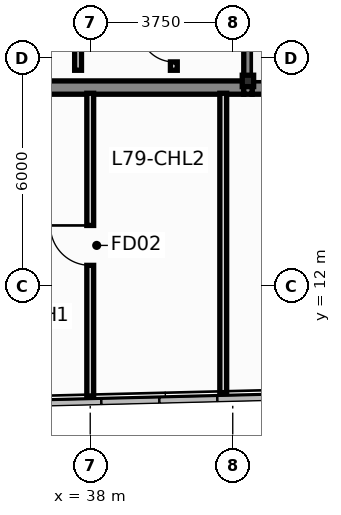
"""IFC4 building model, lengths in metres.
Left out: names, types, materials, properties, quantities, classifications, styles, units other than length and angle.
Written with IfcOpenShell. Run it as: python <this file> out.ifc"""

import sys

from ifc_helpers import new_model, si_unit, direction, frame, frame_2d, origin, origin_2d, place, context, subcontext, project, spatial, rectangle, hollow_rectangle, extrude, source, transform, mapped, element, fill, save


model = new_model("IFC4")
c1 = context("Model", 3, precision=1e-05, world=origin(), true_north=direction((0.0, 1.0)))
c2 = subcontext(c1, "Body", "Model", "MODEL_VIEW")
j1 = project(units=[si_unit("LENGTHUNIT", "METRE"), si_unit("PLANEANGLEUNIT", "RADIAN")], contexts=[c1])
p1 = place(None, origin())
s1 = spatial("IfcSite", under=j1, at=p1, CompositionType="ELEMENT")
p2 = place(p1, origin())
s2 = spatial("IfcBuilding", under=s1, at=p2, CompositionType="ELEMENT")
p3 = place(p2, frame((0.0, 0.0, 300.0)))
s3 = spatial("IfcBuildingStorey", under=s2, at=p3, CompositionType="ELEMENT", Elevation=300.0)
m1 = source(origin(), c2, "Body", "SweptSolid", [
    extrude(hollow_rectangle(XDim=0.3, YDim=0.3, WallThickness=0.012, at=origin_2d()), origin(), (0.0, 0.0, 1.0), 3.4),
])
p4 = place(p3, frame((42.15, 17.4, 0.0), z_axis=(0.0, 0.0, 1.0), x_axis=(1.0, 0.0, 0.0)))
e1 = element("IfcColumn", 1, at=p4, inside=s3, PredefinedType="COLUMN", context=c2, shape_type="MappedRepresentation", body=[
    mapped(m1, transform((0.0, 0.0, 0.0), scale=1.0)),
])
p5 = place(p3, frame((33.96, 17.225, 0.0), z_axis=(0.0, 0.0, 1.0), x_axis=(1.0, 0.0, 0.0)))
e2 = element("IfcWall", 2, at=p5, inside=s3, PredefinedType="SHEAR", context=c2, shape_type="SweptSolid", body=[
    extrude(rectangle(XDim=8.08, YDim=0.35, at=frame_2d((4.04, 0.0))), origin(), (0.0, 0.0, 1.0), 3.4),
])
p6 = place(p3, frame((42.26, 17.225, 0.0), z_axis=(0.0, 0.0, 1.0), x_axis=(1.0, 0.0, 0.0)))
e3 = element("IfcWall", 3, at=p6, inside=s3, PredefinedType="SHEAR", context=c2, shape_type="SweptSolid", body=[
    extrude(rectangle(XDim=2.9, YDim=0.35, at=frame_2d((1.45, 0.0))), origin(), (0.0, 0.0, 1.0), 3.4),
])
p7 = place(p3, frame((42.15, 17.05, 0.0), z_axis=(0.0, 0.0, 1.0), x_axis=(0.0, 1.0, 0.0)))
e4 = element("IfcWall", 4, at=p7, inside=s3, PredefinedType="SHEAR", context=c2, shape_type="SweptSolid", body=[
    extrude(rectangle(XDim=13.125, YDim=0.22, at=frame_2d((6.562, 0.0))), origin(), (0.0, 0.0, 1.0), 3.4),
])
p8 = place(p3, frame((37.68, 17.68, 0.0), z_axis=(0.0, 0.0, 1.0), x_axis=(0.0, 1.0, 0.0)))
e5 = element("IfcWall", 5, at=p8, inside=s3, PredefinedType="PARTITIONING", context=c2, shape_type="SweptSolid", body=[
    extrude(rectangle(XDim=2.7, YDim=0.18, at=frame_2d((1.35, 0.0))), origin(), (0.0, 0.0, 1.0), 3.15),
])
p9 = place(p8, frame((0.85, 0.0, 0.0)))
e6 = element("IfcOpeningElement", 6, at=p9, cuts=e5, PredefinedType="OPENING", context=c2, shape_type="SweptSolid", body=[
    extrude(rectangle(XDim=0.9, YDim=2.1, at=frame_2d((0.45, 1.05))), frame((0.0, 0.102, 0.0), z_axis=(0.0, -1.0, 0.0), x_axis=(1.0, 0.0, 0.0)), (0.0, 0.0, 1.0), 0.204),
])
p10 = place(p3, frame((40.2, 17.68, 0.0), z_axis=(0.0, 0.0, 1.0), x_axis=(0.0, 1.0, 0.0)))
e7 = element("IfcWall", 7, at=p10, inside=s3, PredefinedType="PARTITIONING", context=c2, shape_type="SweptSolid", body=[
    extrude(rectangle(XDim=2.7, YDim=0.18, at=frame_2d((1.35, 0.0))), origin(), (0.0, 0.0, 1.0), 3.15),
])
p11 = place(p10, frame((0.22, 0.0, 0.0)))
e8 = element("IfcOpeningElement", 8, at=p11, cuts=e7, PredefinedType="OPENING", context=c2, shape_type="SweptSolid", body=[
    extrude(rectangle(XDim=0.9, YDim=2.1, at=frame_2d((0.45, 1.05))), frame((0.0, 0.102, 0.0), z_axis=(0.0, -1.0, 0.0), x_axis=(1.0, 0.0, 0.0)), (0.0, 0.0, 1.0), 0.204),
])
p12 = place(p10, frame((1.54, 0.0, 0.0)))
e9 = element("IfcOpeningElement", 9, at=p12, cuts=e7, PredefinedType="OPENING", context=c2, shape_type="SweptSolid", body=[
    extrude(rectangle(XDim=0.9, YDim=2.1, at=frame_2d((0.45, 1.05))), frame((0.0, 0.102, 0.0), z_axis=(0.0, -1.0, 0.0), x_axis=(1.0, 0.0, 0.0)), (0.0, 0.0, 1.0), 0.204),
])
p13 = place(p3, frame((38.0, 9.07, 0.0), z_axis=(0.0, 0.0, 1.0), x_axis=(0.0, 1.0, 0.0)))
e10 = element("IfcWall", 10, at=p13, inside=s3, PredefinedType="PARTITIONING", context=c2, shape_type="SweptSolid", body=[
    extrude(rectangle(XDim=8.005, YDim=0.18, at=frame_2d((4.002, 0.0))), origin(), (0.0, 0.0, 1.0), 3.15),
])
p14 = place(p13, frame((3.477, 0.0, 0.0)))
e11 = element("IfcOpeningElement", 11, at=p14, cuts=e10, PredefinedType="OPENING", context=c2, shape_type="SweptSolid", body=[
    extrude(rectangle(XDim=1.05, YDim=2.15, at=frame_2d((0.525, 1.075))), frame((0.0, 0.102, 0.0), z_axis=(0.0, -1.0, 0.0), x_axis=(1.0, 0.0, 0.0)), (0.0, 0.0, 1.0), 0.204),
])
p15 = place(p3, frame((41.5, 9.15, 0.0), z_axis=(0.0, 0.0, 1.0), x_axis=(0.0, 1.0, 0.0)))
e12 = element("IfcWall", 12, at=p15, inside=s3, PredefinedType="PARTITIONING", context=c2, shape_type="SweptSolid", body=[
    extrude(rectangle(XDim=7.925, YDim=0.18, at=frame_2d((3.962, 0.0))), origin(), (0.0, 0.0, 1.0), 3.15),
])
p16 = place(p11, origin())
e13 = element("IfcDoor", 13, at=p16, inside=s3, OperationType="SINGLE_SWING_RIGHT", PredefinedType="DOOR", context=c2, shape_type="SweptSolid", body=[
    extrude(rectangle(XDim=0.9, YDim=2.1, at=frame_2d((0.45, 1.05))), frame((0.0, 0.025, 0.0), z_axis=(0.0, -1.0, 0.0), x_axis=(1.0, 0.0, 0.0)), (0.0, 0.0, 1.0), 0.05),
])
fill(e8, e13)
p17 = place(p14, origin())
e14 = element("IfcDoor", 14, at=p17, inside=s3, OperationType="SINGLE_SWING_RIGHT", PredefinedType="DOOR", context=c2, shape_type="SweptSolid", body=[
    extrude(rectangle(XDim=1.05, YDim=2.15, at=frame_2d((0.525, 1.075))), frame((0.0, 0.025, 0.0), z_axis=(0.0, -1.0, 0.0), x_axis=(1.0, 0.0, 0.0)), (0.0, 0.0, 1.0), 0.05),
])
fill(e11, e14)
save(model, sys.argv[1])
